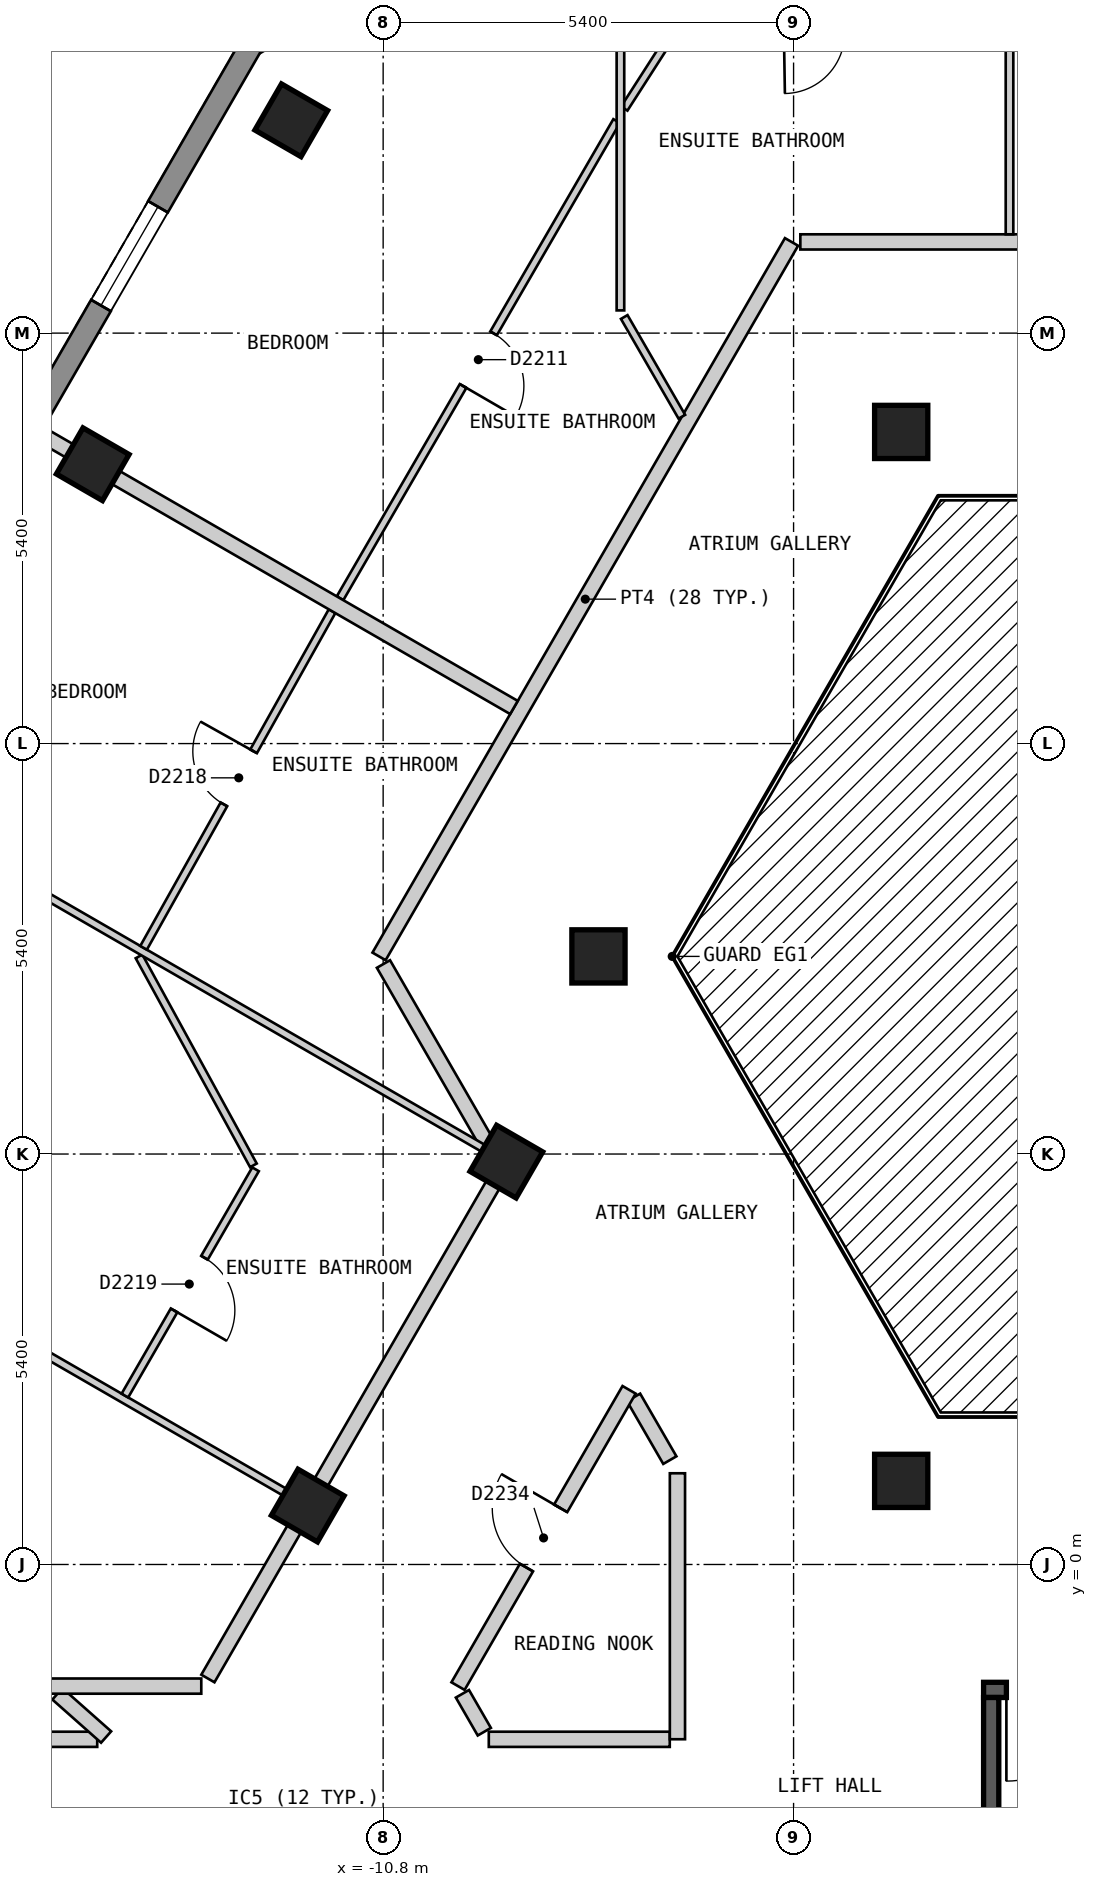
"""IFC4 building model, lengths in metres.
Left out: names, types, materials, properties, quantities, classifications, styles, units other than length and angle.
Written with IfcOpenShell. Run it as: python <this file> out.ifc"""

import sys

from ifc_helpers import new_model, si_unit, direction, frame, frame_2d, origin, origin_2d, place, context, subcontext, project, spatial, polyline, rectangle, outline, extrude, element, fill, save


model = new_model("IFC4")
c1 = context("Model", 3, precision=1e-05, world=origin(), true_north=direction((0.0, 1.0)))
c2 = subcontext(c1, "Body", "Model", "MODEL_VIEW")
j1 = project(units=[si_unit("LENGTHUNIT", "METRE"), si_unit("PLANEANGLEUNIT", "RADIAN")], contexts=[c1])
p1 = place(None, origin())
s1 = spatial("IfcSite", under=j1, at=p1, CompositionType="ELEMENT")
p2 = place(p1, origin())
s2 = spatial("IfcBuilding", under=s1, at=p2, CompositionType="ELEMENT")
p3 = place(p2, frame((0.0, 0.0, 235.8)))
s3 = spatial("IfcBuildingStorey", under=s2, at=p3, CompositionType="ELEMENT", Elevation=235.8)
for number, where, z_axis, x_axis in (
    (1, (-12.009, 19.0, 0.0), (0.0, 0.0, 1.0), (-0.5, -0.866, 0.0)),
    (2, (-14.621, 14.475, 0.0), (0.0, 0.0, 1.0), (-0.5, -0.866, 0.0)),
    (3, (-3.984, 14.9, 0.0), (0.0, 0.0, 1.0), (1.0, 0.0, 0.0)),
    (4, (-7.967, 8.0, 0.0), (0.0, 0.0, 1.0), (1.0, 0.0, 0.0)),
    (5, (-9.179, 5.3, 0.0), (0.0, 0.0, 1.0), (-0.5, -0.866, 0.0)),
    (6, (-3.984, 1.1, 0.0), (0.0, 0.0, 1.0), (1.0, 0.0, 0.0)),
    (7, (-11.792, 0.775, 0.0), (0.0, 0.0, 1.0), (-0.5, -0.866, 0.0)),
):
    element("IfcColumn", number, at=place(p3, frame(where, z_axis=z_axis, x_axis=x_axis)), inside=s3, PredefinedType="COLUMN", context=c2, shape_type="SweptSolid", body=[
        extrude(rectangle(XDim=0.7, YDim=0.7, at=origin_2d()), origin(), (0.0, 0.0, 1.0), 3.0),
    ])
p4 = place(p3, frame((-8.239, 22.47, 0.0), z_axis=(0.0, 0.0, 1.0), x_axis=(-0.866022959057, -0.500004234368, 0.0)))
e8 = element("IfcWall", 8, at=p4, inside=s3, PredefinedType="SOLIDWALL", context=c2, shape_type="SweptSolid", body=[
    extrude(outline(polyline([(0.0, -0.15), (5.0, -0.15), (4.92, 0.15), (0.08, 0.15), (0.0, -0.15)])), origin(), (0.0, 0.0, 1.0), 2.7),
])
p5 = place(p4, frame((0.65, 0.0, 0.15)))
e9 = element("IfcOpeningElement", 9, at=p5, cuts=e8, PredefinedType="OPENING", context=c2, shape_type="SweptSolid", body=[
    extrude(rectangle(XDim=1.2, YDim=2.1, at=frame_2d((0.6, 1.05))), frame((0.0, 0.16, 0.0), z_axis=(0.0, -1.0, 0.0), x_axis=(1.0, 0.0, 0.0)), (0.0, 0.0, 1.0), 0.32),
])
p6 = place(p3, frame((-12.514, 20.025, 0.0), z_axis=(0.0, 0.0, 1.0), x_axis=(-0.500003656944, -0.866023292436, 0.0)))
e10 = element("IfcWall", 10, at=p6, inside=s3, PredefinedType="SOLIDWALL", context=c2, shape_type="SweptSolid", body=[
    extrude(outline(polyline([(0.0, -0.15), (22.17, -0.15), (22.09, 0.15), (0.08, 0.15), (0.0, -0.15)])), origin(), (0.0, 0.0, 1.0), 2.7),
])
p7 = place(p6, frame((2.497, 0.0, 0.15)))
e11 = element("IfcOpeningElement", 11, at=p7, cuts=e10, PredefinedType="OPENING", context=c2, shape_type="SweptSolid", body=[
    extrude(rectangle(XDim=1.5, YDim=2.1, at=frame_2d((0.75, 1.05))), frame((0.0, 0.16, 0.0), z_axis=(0.0, -1.0, 0.0), x_axis=(1.0, 0.0, 0.0)), (0.0, 0.0, 1.0), 0.32),
])
p8 = place(p6, frame((7.722, 0.0, 0.15)))
e12 = element("IfcOpeningElement", 12, at=p8, cuts=e10, PredefinedType="OPENING", context=c2, shape_type="SweptSolid", body=[
    extrude(rectangle(XDim=1.5, YDim=2.1, at=frame_2d((0.75, 1.05))), frame((0.0, 0.16, 0.0), z_axis=(0.0, -1.0, 0.0), x_axis=(1.0, 0.0, 0.0)), (0.0, 0.0, 1.0), 0.32),
])
p9 = place(p6, frame((12.948, 0.0, 0.15)))
e13 = element("IfcOpeningElement", 13, at=p9, cuts=e10, PredefinedType="OPENING", context=c2, shape_type="SweptSolid", body=[
    extrude(rectangle(XDim=1.5, YDim=2.1, at=frame_2d((0.75, 1.05))), frame((0.0, 0.16, 0.0), z_axis=(0.0, -1.0, 0.0), x_axis=(1.0, 0.0, 0.0)), (0.0, 0.0, 1.0), 0.32),
])
p10 = place(p6, frame((18.173, 0.0, 0.15)))
e14 = element("IfcOpeningElement", 14, at=p10, cuts=e10, PredefinedType="OPENING", context=c2, shape_type="SweptSolid", body=[
    extrude(rectangle(XDim=1.5, YDim=2.1, at=frame_2d((0.75, 1.05))), frame((0.0, 0.16, 0.0), z_axis=(0.0, -1.0, 0.0), x_axis=(1.0, 0.0, 0.0)), (0.0, 0.0, 1.0), 0.32),
])
p11 = place(p3, frame((-2.9, -1.65, 0.0), z_axis=(0.0, 0.0, 1.0), x_axis=(1.0, 0.0, 0.0)))
e15 = element("IfcWall", 15, at=p11, inside=s3, PredefinedType="SOLIDWALL", context=c2, shape_type="SweptSolid", body=[
    extrude(rectangle(XDim=5.8, YDim=0.2, at=frame_2d((2.9, 0.0))), origin(), (0.0, 0.0, 1.0), 2.7),
])
p12 = place(p11, frame((0.3, 0.0, 0.0)))
e16 = element("IfcOpeningElement", 16, at=p12, cuts=e15, PredefinedType="OPENING", context=c2, shape_type="SweptSolid", body=[
    extrude(rectangle(XDim=1.2, YDim=2.1, at=frame_2d((0.6, 1.05))), frame((0.0, 0.11, 0.0), z_axis=(0.0, -1.0, 0.0), x_axis=(1.0, 0.0, 0.0)), (0.0, 0.0, 1.0), 0.22),
])
p13 = place(p3, frame((-2.8, -4.5, 0.0), z_axis=(0.0, 0.0, 1.0), x_axis=(0.0, 1.0, 0.0)))
e17 = element("IfcWall", 17, at=p13, inside=s3, PredefinedType="SOLIDWALL", context=c2, shape_type="SweptSolid", body=[
    extrude(rectangle(XDim=2.75, YDim=0.2, at=frame_2d((1.375, 0.0))), origin(), (0.0, 0.0, 1.0), 2.7),
])
p14 = place(p3, frame((-10.796, 7.9, 0.0), z_axis=(0.0, 0.0, 1.0), x_axis=(0.499674397761, -0.866213308731, 0.0)))
e18 = element("IfcWall", 18, at=p14, inside=s3, PredefinedType="PARTITIONING", context=c2, shape_type="SweptSolid", body=[
    extrude(rectangle(XDim=2.785, YDim=0.2, at=frame_2d((1.393, 0.0))), origin(), (0.0, 0.0, 1.0), 2.7),
])
p15 = place(p3, frame((-7.505, 2.198, 0.0), z_axis=(0.0, 0.0, 1.0), x_axis=(0.500409926597, -0.865788603161, 0.0)))
e19 = element("IfcWall", 19, at=p15, inside=s3, PredefinedType="PARTITIONING", context=c2, shape_type="SweptSolid", body=[
    extrude(rectangle(XDim=0.953, YDim=0.2, at=frame_2d((0.477, 0.0))), origin(), (0.0, 0.0, 1.0), 2.7),
])
p16 = place(p3, frame((-9.757, -1.701, 0.0), z_axis=(0.0, 0.0, 1.0), x_axis=(0.49996696679, -0.866044474677, 0.0)))
e20 = element("IfcWall", 20, at=p16, inside=s3, PredefinedType="PARTITIONING", context=c2, shape_type="SweptSolid", body=[
    extrude(rectangle(XDim=0.576, YDim=0.2, at=frame_2d((0.288, 0.0))), origin(), (0.0, 0.0, 1.0), 2.7),
])
p17 = place(p3, frame((-15.899, -2.3, 0.0), z_axis=(0.0, 0.0, 1.0), x_axis=(1.0, 0.0, 0.0)))
e21 = element("IfcWall", 21, at=p17, inside=s3, PredefinedType="PARTITIONING", context=c2, shape_type="SweptSolid", body=[
    extrude(rectangle(XDim=1.337, YDim=0.2, at=frame_2d((0.668, 0.0))), origin(), (0.0, 0.0, 1.0), 2.7),
])
p18 = place(p3, frame((-9.41, -2.3, 0.0), z_axis=(0.0, 0.0, 1.0), x_axis=(1.0, 0.0, 0.0)))
e22 = element("IfcWall", 22, at=p18, inside=s3, PredefinedType="PARTITIONING", context=c2, shape_type="SweptSolid", body=[
    extrude(rectangle(XDim=2.381, YDim=0.2, at=frame_2d((1.19, 0.0))), origin(), (0.0, 0.0, 1.0), 2.7),
])
p19 = place(p3, frame((-5.311, 17.4, 0.0), z_axis=(0.0, 0.0, 1.0), x_axis=(1.0, 0.0, 0.0)))
e23 = element("IfcWall", 23, at=p19, inside=s3, PredefinedType="PARTITIONING", context=c2, shape_type="SweptSolid", body=[
    extrude(rectangle(XDim=10.737, YDim=0.2, at=frame_2d((5.369, 0.0))), origin(), (0.0, 0.0, 1.0), 2.7),
])
p20 = place(p19, frame((4.812, 0.0, 0.0)))
e24 = element("IfcOpeningElement", 24, at=p20, cuts=e23, PredefinedType="OPENING", context=c2, shape_type="SweptSolid", body=[
    extrude(rectangle(XDim=1.0, YDim=2.1, at=frame_2d((0.5, 1.05))), frame((0.0, 0.11, 0.0), z_axis=(0.0, -1.0, 0.0), x_axis=(1.0, 0.0, 0.0)), (0.0, 0.0, 1.0), 0.22),
])
p21 = place(p3, frame((-9.815, -1.6, 0.0), z_axis=(0.0, 0.0, 1.0), x_axis=(0.500058909736, 0.865991389561, 0.0)))
e25 = element("IfcWall", 25, at=p21, inside=s3, PredefinedType="PARTITIONING", context=c2, shape_type="SweptSolid", body=[
    extrude(rectangle(XDim=4.501, YDim=0.2, at=frame_2d((2.251, 0.0))), origin(), (0.0, 0.0, 1.0), 2.7),
])
p22 = place(p21, frame((1.801, 0.0, 0.0)))
e26 = element("IfcOpeningElement", 26, at=p22, cuts=e25, PredefinedType="OPENING", context=c2, shape_type="SweptSolid", body=[
    extrude(rectangle(XDim=0.9, YDim=2.1, at=frame_2d((0.45, 1.05))), frame((0.0, 0.11, 0.0), z_axis=(0.0, -1.0, 0.0), x_axis=(1.0, 0.0, 0.0)), (0.0, 0.0, 1.0), 0.22),
])
p23 = place(p3, frame((-13.106, -1.5, 0.0), z_axis=(0.0, 0.0, 1.0), x_axis=(0.500025705601, 0.86601056214, 0.0)))
e27 = element("IfcWall", 27, at=p23, inside=s3, PredefinedType="PARTITIONING", context=c2, shape_type="SweptSolid", body=[
    extrude(rectangle(XDim=7.735, YDim=0.2, at=frame_2d((3.868, 0.0))), origin(), (0.0, 0.0, 1.0), 2.7),
])
p24 = place(p3, frame((-10.854, 8.0, 0.0), z_axis=(0.0, 0.0, 1.0), x_axis=(0.499997637144, 0.866026767976, 0.0)))
e28 = element("IfcWall", 28, at=p24, inside=s3, PredefinedType="PARTITIONING", context=c2, shape_type="SweptSolid", body=[
    extrude(rectangle(XDim=10.854, YDim=0.2, at=frame_2d((5.427, 0.0))), origin(), (0.0, 0.0, 1.0), 2.7),
])
p25 = place(p3, frame((-6.928, -2.299, 0.0), z_axis=(0.0, 0.0, 1.0), x_axis=(0.0, 1.0, 0.0)))
e29 = element("IfcWall", 29, at=p25, inside=s3, PredefinedType="PARTITIONING", context=c2, shape_type="SweptSolid", body=[
    extrude(rectangle(XDim=3.499, YDim=0.2, at=frame_2d((1.75, 0.0))), origin(), (0.0, 0.0, 1.0), 2.7),
])
p26 = place(p3, frame((-7.628, 16.412, 0.0), z_axis=(0.0, 0.0, 1.0), x_axis=(0.500159472144, -0.86593331292, 0.0)))
e30 = element("IfcWall", 30, at=p26, inside=s3, PredefinedType="PARTITIONING", context=c2, shape_type="SweptSolid", body=[
    extrude(rectangle(XDim=1.515, YDim=0.1, at=frame_2d((0.758, 0.0))), origin(), (0.0, 0.0, 1.0), 2.7),
])
p27 = place(p3, frame((-14.012, 8.0, 0.0), z_axis=(0.0, 0.0, 1.0), x_axis=(0.480183343847, -0.877168145963, 0.0)))
e31 = element("IfcWall", 31, at=p27, inside=s3, PredefinedType="PARTITIONING", context=c2, shape_type="SweptSolid", body=[
    extrude(rectangle(XDim=3.134, YDim=0.1, at=frame_2d((1.567, 0.0))), origin(), (0.0, 0.0, 1.0), 2.7),
])
p28 = place(p3, frame((-2.559, 20.17, 0.0), z_axis=(0.0, 0.0, 1.0), x_axis=(0.0, -1.0, 0.0)))
e32 = element("IfcWall", 32, at=p28, inside=s3, PredefinedType="PARTITIONING", context=c2, shape_type="SweptSolid", body=[
    extrude(rectangle(XDim=2.67, YDim=0.1, at=frame_2d((1.335, 0.0))), origin(), (0.0, 0.0, 1.0), 2.7),
])
p29 = place(p3, frame((-20.539, 5.825, 0.0), z_axis=(0.0, 0.0, 1.0), x_axis=(0.866089650643, -0.499888704662, 0.0)))
e33 = element("IfcWall", 33, at=p29, inside=s3, PredefinedType="PARTITIONING", context=c2, shape_type="SweptSolid", body=[
    extrude(rectangle(XDim=10.0, YDim=0.1, at=frame_2d((5.0, 0.0))), origin(), (0.0, 0.0, 1.0), 2.7),
])
p30 = place(p29, frame((3.196, 0.0, 0.0)))
e34 = element("IfcOpeningElement", 34, at=p30, cuts=e33, PredefinedType="OPENING", context=c2, shape_type="SweptSolid", body=[
    extrude(rectangle(XDim=0.9, YDim=2.1, at=frame_2d((0.45, 1.05))), frame((0.0, 0.06, 0.0), z_axis=(0.0, -1.0, 0.0), x_axis=(1.0, 0.0, 0.0)), (0.0, 0.0, 1.0), 0.12),
])
p31 = place(p3, frame((-17.926, 10.35, 0.0), z_axis=(0.0, 0.0, 1.0), x_axis=(0.866018411306, -0.500012111133, 0.0)))
e35 = element("IfcWall", 35, at=p31, inside=s3, PredefinedType="PARTITIONING", context=c2, shape_type="SweptSolid", body=[
    extrude(rectangle(XDim=9.898, YDim=0.1, at=frame_2d((4.949, 0.0))), origin(), (0.0, 0.0, 1.0), 2.7),
])
p32 = place(p31, frame((1.83, 0.0, 0.0)))
e36 = element("IfcOpeningElement", 36, at=p32, cuts=e35, PredefinedType="OPENING", context=c2, shape_type="SweptSolid", body=[
    extrude(rectangle(XDim=0.9, YDim=2.1, at=frame_2d((0.45, 1.05))), frame((0.0, 0.06, 0.0), z_axis=(0.0, -1.0, 0.0), x_axis=(1.0, 0.0, 0.0)), (0.0, 0.0, 1.0), 0.12),
])
p33 = place(p3, frame((-7.628, 19.154, 0.0), z_axis=(0.0, 0.0, 1.0), x_axis=(0.540600102017, 0.841279697663, 0.0)))
e37 = element("IfcWall", 37, at=p33, inside=s3, PredefinedType="PARTITIONING", context=c2, shape_type="SweptSolid", body=[
    extrude(rectangle(XDim=1.097, YDim=0.1, at=frame_2d((0.548, 0.0))), origin(), (0.0, 0.0, 1.0), 2.7),
])
p34 = place(p3, frame((-14.198, 2.222, 0.0), z_axis=(0.0, 0.0, 1.0), x_axis=(0.500042121486, 0.866001083567, 0.0)))
e38 = element("IfcWall", 38, at=p34, inside=s3, PredefinedType="PARTITIONING", context=c2, shape_type="SweptSolid", body=[
    extrude(rectangle(XDim=3.438, YDim=0.1, at=frame_2d((1.719, 0.0))), origin(), (0.0, 0.0, 1.0), 2.7),
])
p35 = place(p34, frame((1.294, 0.0, 0.0)))
e39 = element("IfcOpeningElement", 39, at=p35, cuts=e38, PredefinedType="OPENING", context=c2, shape_type="SweptSolid", body=[
    extrude(rectangle(XDim=0.8, YDim=2.1, at=frame_2d((0.4, 1.05))), frame((0.0, 0.06, 0.0), z_axis=(0.0, -1.0, 0.0), x_axis=(1.0, 0.0, 0.0)), (0.0, 0.0, 1.0), 0.12),
])
p36 = place(p3, frame((-11.367, 12.712, 0.0), z_axis=(0.0, 0.0, 1.0), x_axis=(0.501473866443, 0.865172792727, 0.0)))
e40 = element("IfcWall", 40, at=p36, inside=s3, PredefinedType="PARTITIONING", context=c2, shape_type="SweptSolid", body=[
    extrude(rectangle(XDim=7.256, YDim=0.1, at=frame_2d((3.628, 0.0))), origin(), (0.0, 0.0, 1.0), 2.7),
])
p37 = place(p36, frame((3.228, 0.0, 0.0)))
e41 = element("IfcOpeningElement", 41, at=p37, cuts=e40, PredefinedType="OPENING", context=c2, shape_type="SweptSolid", body=[
    extrude(rectangle(XDim=0.8, YDim=2.1, at=frame_2d((0.4, 1.05))), frame((0.0, 0.06, 0.0), z_axis=(0.0, -1.0, 0.0), x_axis=(1.0, 0.0, 0.0)), (0.0, 0.0, 1.0), 0.12),
])
p38 = place(p3, frame((-13.952, 8.113, 0.0), z_axis=(0.0, 0.0, 1.0), x_axis=(0.488568218554, 0.872525699231, 0.0)))
e42 = element("IfcWall", 42, at=p38, inside=s3, PredefinedType="PARTITIONING", context=c2, shape_type="SweptSolid", body=[
    extrude(rectangle(XDim=5.076, YDim=0.1, at=frame_2d((2.538, 0.0))), origin(), (0.0, 0.0, 1.0), 2.7),
])
p39 = place(p38, frame((2.163, 0.0, 0.0)))
e43 = element("IfcOpeningElement", 43, at=p39, cuts=e42, PredefinedType="OPENING", context=c2, shape_type="SweptSolid", body=[
    extrude(rectangle(XDim=0.8, YDim=2.1, at=frame_2d((0.4, 1.05))), frame((0.0, 0.06, 0.0), z_axis=(0.0, -1.0, 0.0), x_axis=(1.0, 0.0, 0.0)), (0.0, 0.0, 1.0), 0.12),
])
p40 = place(p3, frame((-7.678, 16.499, 0.0), z_axis=(0.0, 0.0, 1.0), x_axis=(0.0, 1.0, 0.0)))
e44 = element("IfcWall", 44, at=p40, inside=s3, PredefinedType="PARTITIONING", context=c2, shape_type="SweptSolid", body=[
    extrude(rectangle(XDim=5.801, YDim=0.1, at=frame_2d((2.9, 0.0))), origin(), (0.0, 0.0, 1.0), 2.7),
])
p41 = place(p40, frame((3.44, 0.0, 0.0)))
e45 = element("IfcOpeningElement", 45, at=p41, cuts=e44, PredefinedType="OPENING", context=c2, shape_type="SweptSolid", body=[
    extrude(rectangle(XDim=0.9, YDim=2.1, at=frame_2d((0.45, 1.05))), frame((0.0, 0.06, 0.0), z_axis=(0.0, -1.0, 0.0), x_axis=(1.0, 0.0, 0.0)), (0.0, 0.0, 1.0), 0.12),
])
p42 = place(p3, frame((-15.314, 14.875, 0.0), z_axis=(0.0, 0.0, 1.0), x_axis=(0.866001485781, -0.500041424909, 0.0)))
e46 = element("IfcWall", 46, at=p42, inside=s3, PredefinedType="PARTITIONING", context=c2, shape_type="SweptSolid", body=[
    extrude(rectangle(XDim=7.2, YDim=0.2, at=frame_2d((3.6, 0.0))), origin(), (0.0, 0.0, 1.0), 2.7),
])
p43 = place(p3, frame((-15.086, -1.702, 0.0), z_axis=(0.0, 0.0, 1.0), x_axis=(0.748305129876, -0.663354680846, 0.0)))
e47 = element("IfcWall", 47, at=p43, inside=s3, PredefinedType="PARTITIONING", context=c2, shape_type="SweptSolid", body=[
    extrude(rectangle(XDim=0.856, YDim=0.2, at=frame_2d((0.428, 0.0))), origin(), (0.0, 0.0, 1.0), 2.7),
])
p44 = place(p3, frame((-15.198, -1.6, 0.0), z_axis=(0.0, 0.0, 1.0), x_axis=(1.0, 0.0, 0.0)))
e48 = element("IfcWall", 48, at=p44, inside=s3, PredefinedType="PARTITIONING", context=c2, shape_type="SweptSolid", body=[
    extrude(rectangle(XDim=2.005, YDim=0.2, at=frame_2d((1.002, 0.0))), origin(), (0.0, 0.0, 1.0), 2.7),
])
p45 = place(p7, origin())
e49 = element("IfcWindow", 49, at=p45, inside=s3, PartitioningType="SINGLE_PANEL", PredefinedType="WINDOW", context=c2, shape_type="SweptSolid", body=[
    extrude(rectangle(XDim=1.5, YDim=2.1, at=frame_2d((0.75, 1.05))), frame((0.0, 0.03, 0.0), z_axis=(0.0, -1.0, 0.0), x_axis=(1.0, 0.0, 0.0)), (0.0, 0.0, 1.0), 0.06),
])
fill(e11, e49)
p46 = place(p12, origin())
e50 = element("IfcDoor", 50, at=p46, inside=s3, OperationType="SINGLE_SWING_LEFT", PredefinedType="DOOR", context=c2, shape_type="SweptSolid", body=[
    extrude(rectangle(XDim=1.2, YDim=2.1, at=frame_2d((0.6, 1.05))), frame((0.0, 0.025, 0.0), z_axis=(0.0, -1.0, 0.0), x_axis=(1.0, 0.0, 0.0)), (0.0, 0.0, 1.0), 0.05),
])
fill(e16, e50)
p47 = place(p37, origin())
e51 = element("IfcDoor", 51, at=p47, inside=s3, OperationType="SINGLE_SWING_LEFT", PredefinedType="DOOR", context=c2, shape_type="SweptSolid", body=[
    extrude(rectangle(XDim=0.8, YDim=2.1, at=frame_2d((0.4, 1.05))), frame((0.0, 0.025, 0.0), z_axis=(0.0, -1.0, 0.0), x_axis=(1.0, 0.0, 0.0)), (0.0, 0.0, 1.0), 0.05),
])
fill(e41, e51)
p48 = place(p39, origin())
e52 = element("IfcDoor", 52, at=p48, inside=s3, OperationType="SINGLE_SWING_RIGHT", PredefinedType="DOOR", context=c2, shape_type="SweptSolid", body=[
    extrude(rectangle(XDim=0.8, YDim=2.1, at=frame_2d((0.4, 1.05))), frame((0.0, 0.025, 0.0), z_axis=(0.0, -1.0, 0.0), x_axis=(1.0, 0.0, 0.0)), (0.0, 0.0, 1.0), 0.05),
])
fill(e43, e52)
p49 = place(p35, origin())
e53 = element("IfcDoor", 53, at=p49, inside=s3, OperationType="SINGLE_SWING_LEFT", PredefinedType="DOOR", context=c2, shape_type="SweptSolid", body=[
    extrude(rectangle(XDim=0.8, YDim=2.1, at=frame_2d((0.4, 1.05))), frame((0.0, 0.025, 0.0), z_axis=(0.0, -1.0, 0.0), x_axis=(1.0, 0.0, 0.0)), (0.0, 0.0, 1.0), 0.05),
])
fill(e39, e53)
p50 = place(p22, origin())
e54 = element("IfcDoor", 54, at=p50, inside=s3, OperationType="SINGLE_SWING_RIGHT", PredefinedType="DOOR", context=c2, shape_type="SweptSolid", body=[
    extrude(rectangle(XDim=0.9, YDim=2.1, at=frame_2d((0.45, 1.05))), frame((0.0, 0.025, 0.0), z_axis=(0.0, -1.0, 0.0), x_axis=(1.0, 0.0, 0.0)), (0.0, 0.0, 1.0), 0.05),
])
fill(e26, e54)
save(model, sys.argv[1])
